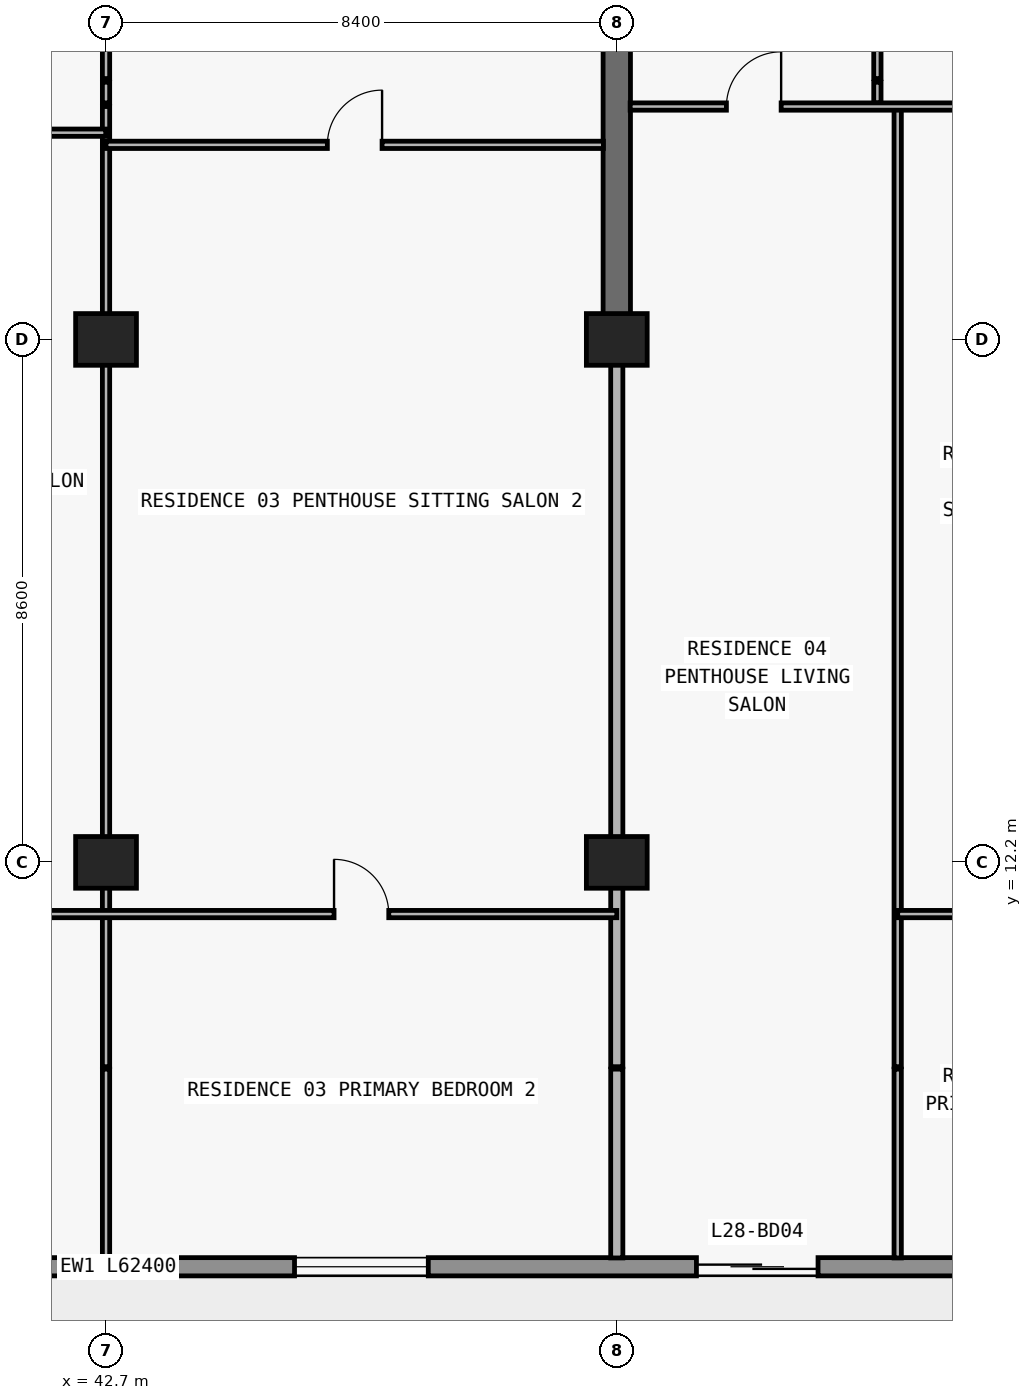
"""IFC4 building model, lengths in metres.
Left out: names, types, materials, properties, quantities, classifications, styles, units other than length and angle.
Written with IfcOpenShell. Run it as: python <this file> out.ifc"""

import sys

from ifc_helpers import new_model, si_unit, direction, frame, frame_2d, origin, origin_2d, place, context, subcontext, project, spatial, rectangle, extrude, element, fill, save


model = new_model("IFC4")
c1 = context("Model", 3, precision=1e-05, world=origin(), true_north=direction((0.0, 1.0)))
c2 = subcontext(c1, "Body", "Model", "MODEL_VIEW")
j1 = project(units=[si_unit("LENGTHUNIT", "METRE"), si_unit("PLANEANGLEUNIT", "RADIAN")], contexts=[c1])
p1 = place(None, origin())
s1 = spatial("IfcSite", under=j1, at=p1, CompositionType="ELEMENT")
p2 = place(p1, origin())
s2 = spatial("IfcBuilding", under=s1, at=p2, CompositionType="ELEMENT")
p3 = place(p2, frame((0.0, 0.0, 105.9)))
s3 = spatial("IfcBuildingStorey", under=s2, at=p3, CompositionType="ELEMENT", Elevation=105.9)
for number, where, z_axis, x_axis in (
    (1, (42.7, 12.2, 0.0), (0.0, 0.0, 1.0), (1.0, 0.0, 0.0)),
    (2, (51.1, 12.2, 0.0), (0.0, 0.0, 1.0), (1.0, 0.0, 0.0)),
    (3, (42.7, 20.8, 0.0), (0.0, 0.0, 1.0), (1.0, 0.0, 0.0)),
    (4, (51.1, 20.8, 0.0), (0.0, 0.0, 1.0), (1.0, 0.0, 0.0)),
):
    element("IfcColumn", number, at=place(p3, frame(where, z_axis=z_axis, x_axis=x_axis)), inside=s3, PredefinedType="COLUMN", context=c2, shape_type="SweptSolid", body=[
        extrude(rectangle(XDim=1.0, YDim=0.85, at=origin_2d()), origin(), (0.0, 0.0, 1.0), 3.05),
    ])
p4 = place(p3, frame((51.1, 20.8, 0.0), z_axis=(0.0, 0.0, 1.0), x_axis=(0.0, 1.0, 0.0)))
e5 = element("IfcWall", 5, at=p4, inside=s3, PredefinedType="SHEAR", context=c2, shape_type="SweptSolid", body=[
    extrude(rectangle(XDim=8.6, YDim=0.45, at=frame_2d((4.3, 0.0))), origin(), (0.0, 0.0, 1.0), 3.05),
])
p5 = place(p3, frame((70.1, 5.55, 0.0), z_axis=(0.0, 0.0, 1.0), x_axis=(-1.0, 0.0, 0.0)))
e6 = element("IfcWall", 6, at=p5, inside=s3, PredefinedType="STANDARD", context=c2, shape_type="SweptSolid", body=[
    extrude(rectangle(XDim=62.4, YDim=0.3, at=frame_2d((31.2, 0.0))), origin(), (0.0, 0.0, 1.0), 3.05),
])
p6 = place(p5, frame((57.226, 0.0, 0.0)))
e7 = element("IfcOpeningElement", 7, at=p6, cuts=e6, PredefinedType="OPENING", context=c2, shape_type="SweptSolid", body=[
    extrude(rectangle(XDim=2.0, YDim=2.3, at=frame_2d((1.0, 1.15))), frame((0.0, 0.16, 0.0), z_axis=(0.0, -1.0, 0.0), x_axis=(1.0, 0.0, 0.0)), (0.0, 0.0, 1.0), 0.32),
])
p7 = place(p5, frame((52.926, 0.0, 0.85)))
e8 = element("IfcOpeningElement", 8, at=p7, cuts=e6, PredefinedType="OPENING", context=c2, shape_type="SweptSolid", body=[
    extrude(rectangle(XDim=2.2, YDim=1.55, at=frame_2d((1.1, 0.775))), frame((0.0, 0.16, 0.0), z_axis=(0.0, -1.0, 0.0), x_axis=(1.0, 0.0, 0.0)), (0.0, 0.0, 1.0), 0.32),
])
p8 = place(p5, frame((48.49, 0.0, 0.0)))
e9 = element("IfcOpeningElement", 9, at=p8, cuts=e6, PredefinedType="OPENING", context=c2, shape_type="SweptSolid", body=[
    extrude(rectangle(XDim=2.0, YDim=2.3, at=frame_2d((1.0, 1.15))), frame((0.0, 0.16, 0.0), z_axis=(0.0, -1.0, 0.0), x_axis=(1.0, 0.0, 0.0)), (0.0, 0.0, 1.0), 0.32),
])
p9 = place(p5, frame((44.39, 0.0, 0.85)))
e10 = element("IfcOpeningElement", 10, at=p9, cuts=e6, PredefinedType="OPENING", context=c2, shape_type="SweptSolid", body=[
    extrude(rectangle(XDim=1.8, YDim=1.55, at=frame_2d((0.9, 0.775))), frame((0.0, 0.16, 0.0), z_axis=(0.0, -1.0, 0.0), x_axis=(1.0, 0.0, 0.0)), (0.0, 0.0, 1.0), 0.32),
])
p10 = place(p5, frame((40.49, 0.0, 0.0)))
e11 = element("IfcOpeningElement", 11, at=p10, cuts=e6, PredefinedType="OPENING", context=c2, shape_type="SweptSolid", body=[
    extrude(rectangle(XDim=2.0, YDim=2.3, at=frame_2d((1.0, 1.15))), frame((0.0, 0.16, 0.0), z_axis=(0.0, -1.0, 0.0), x_axis=(1.0, 0.0, 0.0)), (0.0, 0.0, 1.0), 0.32),
])
p11 = place(p5, frame((35.81, 0.0, 0.65)))
e12 = element("IfcOpeningElement", 12, at=p11, cuts=e6, PredefinedType="OPENING", context=c2, shape_type="SweptSolid", body=[
    extrude(rectangle(XDim=2.6, YDim=1.85, at=frame_2d((1.3, 0.925))), frame((0.0, 0.16, 0.0), z_axis=(0.0, -1.0, 0.0), x_axis=(1.0, 0.0, 0.0)), (0.0, 0.0, 1.0), 0.32),
])
p12 = place(p5, frame((30.1, 0.0, 0.85)))
e13 = element("IfcOpeningElement", 13, at=p12, cuts=e6, PredefinedType="OPENING", context=c2, shape_type="SweptSolid", body=[
    extrude(rectangle(XDim=2.2, YDim=1.55, at=frame_2d((1.1, 0.775))), frame((0.0, 0.16, 0.0), z_axis=(0.0, -1.0, 0.0), x_axis=(1.0, 0.0, 0.0)), (0.0, 0.0, 1.0), 0.32),
])
p13 = place(p5, frame((22.1, 0.0, 0.85)))
e14 = element("IfcOpeningElement", 14, at=p13, cuts=e6, PredefinedType="OPENING", context=c2, shape_type="SweptSolid", body=[
    extrude(rectangle(XDim=2.2, YDim=1.55, at=frame_2d((1.1, 0.775))), frame((0.0, 0.16, 0.0), z_axis=(0.0, -1.0, 0.0), x_axis=(1.0, 0.0, 0.0)), (0.0, 0.0, 1.0), 0.32),
])
p14 = place(p5, frame((15.69, 0.0, 0.0)))
e15 = element("IfcOpeningElement", 15, at=p14, cuts=e6, PredefinedType="OPENING", context=c2, shape_type="SweptSolid", body=[
    extrude(rectangle(XDim=2.0, YDim=2.3, at=frame_2d((1.0, 1.15))), frame((0.0, 0.16, 0.0), z_axis=(0.0, -1.0, 0.0), x_axis=(1.0, 0.0, 0.0)), (0.0, 0.0, 1.0), 0.32),
])
p15 = place(p5, frame((11.59, 0.0, 0.85)))
e16 = element("IfcOpeningElement", 16, at=p15, cuts=e6, PredefinedType="OPENING", context=c2, shape_type="SweptSolid", body=[
    extrude(rectangle(XDim=1.8, YDim=1.55, at=frame_2d((0.9, 0.775))), frame((0.0, 0.16, 0.0), z_axis=(0.0, -1.0, 0.0), x_axis=(1.0, 0.0, 0.0)), (0.0, 0.0, 1.0), 0.32),
])
p16 = place(p5, frame((7.626, 0.0, 0.0)))
e17 = element("IfcOpeningElement", 17, at=p16, cuts=e6, PredefinedType="OPENING", context=c2, shape_type="SweptSolid", body=[
    extrude(rectangle(XDim=2.0, YDim=2.3, at=frame_2d((1.0, 1.15))), frame((0.0, 0.16, 0.0), z_axis=(0.0, -1.0, 0.0), x_axis=(1.0, 0.0, 0.0)), (0.0, 0.0, 1.0), 0.32),
])
p17 = place(p5, frame((3.326, 0.0, 0.85)))
e18 = element("IfcOpeningElement", 18, at=p17, cuts=e6, PredefinedType="OPENING", context=c2, shape_type="SweptSolid", body=[
    extrude(rectangle(XDim=2.2, YDim=1.55, at=frame_2d((1.1, 0.775))), frame((0.0, 0.16, 0.0), z_axis=(0.0, -1.0, 0.0), x_axis=(1.0, 0.0, 0.0)), (0.0, 0.0, 1.0), 0.32),
])
p18 = place(p3, frame((42.7, 5.695, 0.0), z_axis=(0.0, 0.0, 1.0), x_axis=(0.0, 1.0, 0.0)))
e19 = element("IfcWall", 19, at=p18, inside=s3, PredefinedType="PARTITIONING", context=c2, shape_type="SweptSolid", body=[
    extrude(rectangle(XDim=3.105, YDim=0.12, at=frame_2d((1.552, 0.0))), origin(), (0.0, 0.0, 1.0), 3.05),
])
p19 = place(p3, frame((42.7, 8.84, 0.0), z_axis=(0.0, 0.0, 1.0), x_axis=(0.0, 1.0, 0.0)))
e20 = element("IfcWall", 20, at=p19, inside=s3, PredefinedType="PARTITIONING", context=c2, shape_type="SweptSolid", body=[
    extrude(rectangle(XDim=15.79, YDim=0.12, at=frame_2d((7.895, 0.0))), origin(), (0.0, 0.0, 1.0), 2.174),
])
p20 = place(p3, frame((42.7, 24.69, 0.0), z_axis=(0.0, 0.0, 1.0), x_axis=(0.0, 1.0, 0.0)))
e21 = element("IfcWall", 21, at=p20, inside=s3, PredefinedType="PARTITIONING", context=c2, shape_type="SweptSolid", body=[
    extrude(rectangle(XDim=0.34, YDim=0.12, at=frame_2d((0.17, 0.0))), origin(), (0.0, 0.0, 1.0), 2.174),
])
p21 = place(p3, frame((42.7, 25.09, 0.0), z_axis=(0.0, 0.0, 1.0), x_axis=(0.0, 1.0, 0.0)))
e22 = element("IfcWall", 22, at=p21, inside=s3, PredefinedType="PARTITIONING", context=c2, shape_type="SweptSolid", body=[
    extrude(rectangle(XDim=4.69, YDim=0.12, at=frame_2d((2.345, 0.0))), origin(), (0.0, 0.0, 1.0), 2.174),
])
p22 = place(p21, frame((1.305, 0.0, 0.0)))
e23 = element("IfcOpeningElement", 23, at=p22, cuts=e22, PredefinedType="OPENING", context=c2, shape_type="SweptSolid", body=[
    extrude(rectangle(XDim=0.9, YDim=2.124, at=frame_2d((0.45, 1.062))), frame((0.0, 0.07, 0.0), z_axis=(0.0, -1.0, 0.0), x_axis=(1.0, 0.0, 0.0)), (0.0, 0.0, 1.0), 0.14),
])
p23 = place(p3, frame((51.1, 5.695, 0.0), z_axis=(0.0, 0.0, 1.0), x_axis=(0.0, 1.0, 0.0)))
e24 = element("IfcWall", 24, at=p23, inside=s3, PredefinedType="PARTITIONING", context=c2, shape_type="SweptSolid", body=[
    extrude(rectangle(XDim=3.105, YDim=0.2, at=frame_2d((1.552, 0.0))), origin(), (0.0, 0.0, 1.0), 3.05),
])
p24 = place(p3, frame((51.1, 8.84, 0.0), z_axis=(0.0, 0.0, 1.0), x_axis=(0.0, 1.0, 0.0)))
e25 = element("IfcWall", 25, at=p24, inside=s3, PredefinedType="PARTITIONING", context=c2, shape_type="SweptSolid", body=[
    extrude(rectangle(XDim=11.955, YDim=0.2, at=frame_2d((5.978, 0.0))), origin(), (0.0, 0.0, 1.0), 2.174),
])
p25 = place(p3, frame((55.386, 24.69, 0.0), z_axis=(0.0, 0.0, 1.0), x_axis=(0.0, 1.0, 0.0)))
e26 = element("IfcWall", 26, at=p25, inside=s3, PredefinedType="PARTITIONING", context=c2, shape_type="SweptSolid", body=[
    extrude(rectangle(XDim=0.34, YDim=0.12, at=frame_2d((0.17, 0.0))), origin(), (0.0, 0.0, 1.0), 3.05),
])
p26 = place(p3, frame((55.386, 25.09, 0.0), z_axis=(0.0, 0.0, 1.0), x_axis=(0.0, 1.0, 0.0)))
e27 = element("IfcWall", 27, at=p26, inside=s3, PredefinedType="PARTITIONING", context=c2, shape_type="SweptSolid", body=[
    extrude(rectangle(XDim=4.69, YDim=0.12, at=frame_2d((2.345, 0.0))), origin(), (0.0, 0.0, 1.0), 2.725),
])
p27 = place(p26, frame((1.895, 0.0, 0.0)))
e28 = element("IfcOpeningElement", 28, at=p27, cuts=e27, PredefinedType="OPENING", context=c2, shape_type="SweptSolid", body=[
    extrude(rectangle(XDim=0.9, YDim=2.15, at=frame_2d((0.45, 1.075))), frame((0.0, 0.07, 0.0), z_axis=(0.0, -1.0, 0.0), x_axis=(1.0, 0.0, 0.0)), (0.0, 0.0, 1.0), 0.14),
])
p28 = place(p3, frame((55.72, 5.695, 0.0), z_axis=(0.0, 0.0, 1.0), x_axis=(0.0, 1.0, 0.0)))
e29 = element("IfcWall", 29, at=p28, inside=s3, PredefinedType="PARTITIONING", context=c2, shape_type="SweptSolid", body=[
    extrude(rectangle(XDim=3.105, YDim=0.12, at=frame_2d((1.552, 0.0))), origin(), (0.0, 0.0, 1.0), 3.05),
])
p29 = place(p3, frame((55.72, 8.84, 0.0), z_axis=(0.0, 0.0, 1.0), x_axis=(0.0, 1.0, 0.0)))
e30 = element("IfcWall", 30, at=p29, inside=s3, PredefinedType="PARTITIONING", context=c2, shape_type="SweptSolid", body=[
    extrude(rectangle(XDim=15.79, YDim=0.12, at=frame_2d((7.895, 0.0))), origin(), (0.0, 0.0, 1.0), 3.05),
])
p30 = place(p3, frame((35.1, 11.35, 0.0), z_axis=(0.0, 0.0, 1.0), x_axis=(1.0, 0.0, 0.0)))
e31 = element("IfcWall", 31, at=p30, inside=s3, PredefinedType="PARTITIONING", context=c2, shape_type="SweptSolid", body=[
    extrude(rectangle(XDim=16.0, YDim=0.12, at=frame_2d((8.0, 0.0))), origin(), (0.0, 0.0, 1.0), 3.05),
])
p31 = place(p30, frame((3.35, 0.0, 0.0)))
e32 = element("IfcOpeningElement", 32, at=p31, cuts=e31, PredefinedType="OPENING", context=c2, shape_type="SweptSolid", body=[
    extrude(rectangle(XDim=0.9, YDim=2.15, at=frame_2d((0.45, 1.075))), frame((0.0, 0.07, 0.0), z_axis=(0.0, -1.0, 0.0), x_axis=(1.0, 0.0, 0.0)), (0.0, 0.0, 1.0), 0.14),
])
p32 = place(p30, frame((11.35, 0.0, 0.0)))
e33 = element("IfcOpeningElement", 33, at=p32, cuts=e31, PredefinedType="OPENING", context=c2, shape_type="SweptSolid", body=[
    extrude(rectangle(XDim=0.9, YDim=2.15, at=frame_2d((0.45, 1.075))), frame((0.0, 0.07, 0.0), z_axis=(0.0, -1.0, 0.0), x_axis=(1.0, 0.0, 0.0)), (0.0, 0.0, 1.0), 0.14),
])
p33 = place(p3, frame((55.72, 11.35, 0.0), z_axis=(0.0, 0.0, 1.0), x_axis=(1.0, 0.0, 0.0)))
e34 = element("IfcWall", 34, at=p33, inside=s3, PredefinedType="PARTITIONING", context=c2, shape_type="SweptSolid", body=[
    extrude(rectangle(XDim=3.78, YDim=0.12, at=frame_2d((1.89, 0.0))), origin(), (0.0, 0.0, 1.0), 3.05),
])
p34 = place(p33, frame((1.44, 0.0, 0.0)))
e35 = element("IfcOpeningElement", 35, at=p34, cuts=e34, PredefinedType="OPENING", context=c2, shape_type="SweptSolid", body=[
    extrude(rectangle(XDim=0.9, YDim=2.15, at=frame_2d((0.45, 1.075))), frame((0.0, 0.07, 0.0), z_axis=(0.0, -1.0, 0.0), x_axis=(1.0, 0.0, 0.0)), (0.0, 0.0, 1.0), 0.14),
])
p35 = place(p3, frame((42.7, 24.0, 0.0), z_axis=(0.0, 0.0, 1.0), x_axis=(1.0, 0.0, 0.0)))
e36 = element("IfcWall", 36, at=p35, inside=s3, PredefinedType="PARTITIONING", context=c2, shape_type="SweptSolid", body=[
    extrude(rectangle(XDim=8.18, YDim=0.12, at=frame_2d((4.09, 0.0))), origin(), (0.0, 0.0, 1.0), 3.05),
])
p36 = place(p35, frame((3.64, 0.0, 0.0)))
e37 = element("IfcOpeningElement", 37, at=p36, cuts=e36, PredefinedType="OPENING", context=c2, shape_type="SweptSolid", body=[
    extrude(rectangle(XDim=0.9, YDim=2.15, at=frame_2d((0.45, 1.075))), frame((0.0, 0.07, 0.0), z_axis=(0.0, -1.0, 0.0), x_axis=(1.0, 0.0, 0.0)), (0.0, 0.0, 1.0), 0.14),
])
p37 = place(p3, frame((35.105, 24.2, 0.0), z_axis=(0.0, 0.0, 1.0), x_axis=(1.0, 0.0, 0.0)))
e38 = element("IfcWall", 38, at=p37, inside=s3, PredefinedType="PARTITIONING", context=c2, shape_type="SweptSolid", body=[
    extrude(rectangle(XDim=7.59, YDim=0.12, at=frame_2d((3.795, 0.0))), origin(), (0.0, 0.0, 1.0), 3.05),
])
p38 = place(p37, frame((3.345, 0.0, 0.0)))
e39 = element("IfcOpeningElement", 39, at=p38, cuts=e38, PredefinedType="OPENING", context=c2, shape_type="SweptSolid", body=[
    extrude(rectangle(XDim=0.9, YDim=2.15, at=frame_2d((0.45, 1.075))), frame((0.0, 0.07, 0.0), z_axis=(0.0, -1.0, 0.0), x_axis=(1.0, 0.0, 0.0)), (0.0, 0.0, 1.0), 0.14),
])
p39 = place(p3, frame((51.32, 24.63, 0.0), z_axis=(0.0, 0.0, 1.0), x_axis=(1.0, 0.0, 0.0)))
e40 = element("IfcWall", 40, at=p39, inside=s3, PredefinedType="PARTITIONING", context=c2, shape_type="SweptSolid", body=[
    extrude(rectangle(XDim=8.18, YDim=0.12, at=frame_2d((4.09, 0.0))), origin(), (0.0, 0.0, 1.0), 3.05),
])
p40 = place(p39, frame((1.583, 0.0, 0.0)))
e41 = element("IfcOpeningElement", 41, at=p40, cuts=e40, PredefinedType="OPENING", context=c2, shape_type="SweptSolid", body=[
    extrude(rectangle(XDim=0.9, YDim=2.15, at=frame_2d((0.45, 1.075))), frame((0.0, 0.07, 0.0), z_axis=(0.0, -1.0, 0.0), x_axis=(1.0, 0.0, 0.0)), (0.0, 0.0, 1.0), 0.14),
])
p41 = place(p39, frame((5.84, 0.0, 0.0)))
e42 = element("IfcOpeningElement", 42, at=p41, cuts=e40, PredefinedType="OPENING", context=c2, shape_type="SweptSolid", body=[
    extrude(rectangle(XDim=0.9, YDim=2.15, at=frame_2d((0.45, 1.075))), frame((0.0, 0.07, 0.0), z_axis=(0.0, -1.0, 0.0), x_axis=(1.0, 0.0, 0.0)), (0.0, 0.0, 1.0), 0.14),
])
p42 = place(p13, origin())
e43 = element("IfcWindow", 43, at=p42, inside=s3, PartitioningType="SINGLE_PANEL", PredefinedType="WINDOW", context=c2, shape_type="SweptSolid", body=[
    extrude(rectangle(XDim=2.2, YDim=1.55, at=frame_2d((1.1, 0.775))), frame((0.0, 0.03, 0.0), z_axis=(0.0, -1.0, 0.0), x_axis=(1.0, 0.0, 0.0)), (0.0, 0.0, 1.0), 0.06),
])
fill(e14, e43)
p43 = place(p14, origin())
e44 = element("IfcDoor", 44, at=p43, inside=s3, OperationType="DOUBLE_DOOR_SLIDING", PredefinedType="DOOR", context=c2, shape_type="SweptSolid", body=[
    extrude(rectangle(XDim=2.0, YDim=2.3, at=frame_2d((1.0, 1.15))), frame((0.0, 0.025, 0.0), z_axis=(0.0, -1.0, 0.0), x_axis=(1.0, 0.0, 0.0)), (0.0, 0.0, 1.0), 0.05),
])
fill(e15, e44)
p44 = place(p36, origin())
e45 = element("IfcDoor", 45, at=p44, inside=s3, OperationType="SINGLE_SWING_RIGHT", PredefinedType="DOOR", context=c2, shape_type="SweptSolid", body=[
    extrude(rectangle(XDim=0.9, YDim=2.15, at=frame_2d((0.45, 1.075))), frame((0.0, 0.025, 0.0), z_axis=(0.0, -1.0, 0.0), x_axis=(1.0, 0.0, 0.0)), (0.0, 0.0, 1.0), 0.05),
])
fill(e37, e45)
p45 = place(p32, origin())
e46 = element("IfcDoor", 46, at=p45, inside=s3, OperationType="SINGLE_SWING_LEFT", PredefinedType="DOOR", context=c2, shape_type="SweptSolid", body=[
    extrude(rectangle(XDim=0.9, YDim=2.15, at=frame_2d((0.45, 1.075))), frame((0.0, 0.025, 0.0), z_axis=(0.0, -1.0, 0.0), x_axis=(1.0, 0.0, 0.0)), (0.0, 0.0, 1.0), 0.05),
])
fill(e33, e46)
p46 = place(p40, origin())
e47 = element("IfcDoor", 47, at=p46, inside=s3, OperationType="SINGLE_SWING_RIGHT", PredefinedType="DOOR", context=c2, shape_type="SweptSolid", body=[
    extrude(rectangle(XDim=0.9, YDim=2.15, at=frame_2d((0.45, 1.075))), frame((0.0, 0.025, 0.0), z_axis=(0.0, -1.0, 0.0), x_axis=(1.0, 0.0, 0.0)), (0.0, 0.0, 1.0), 0.05),
])
fill(e41, e47)
save(model, sys.argv[1])
